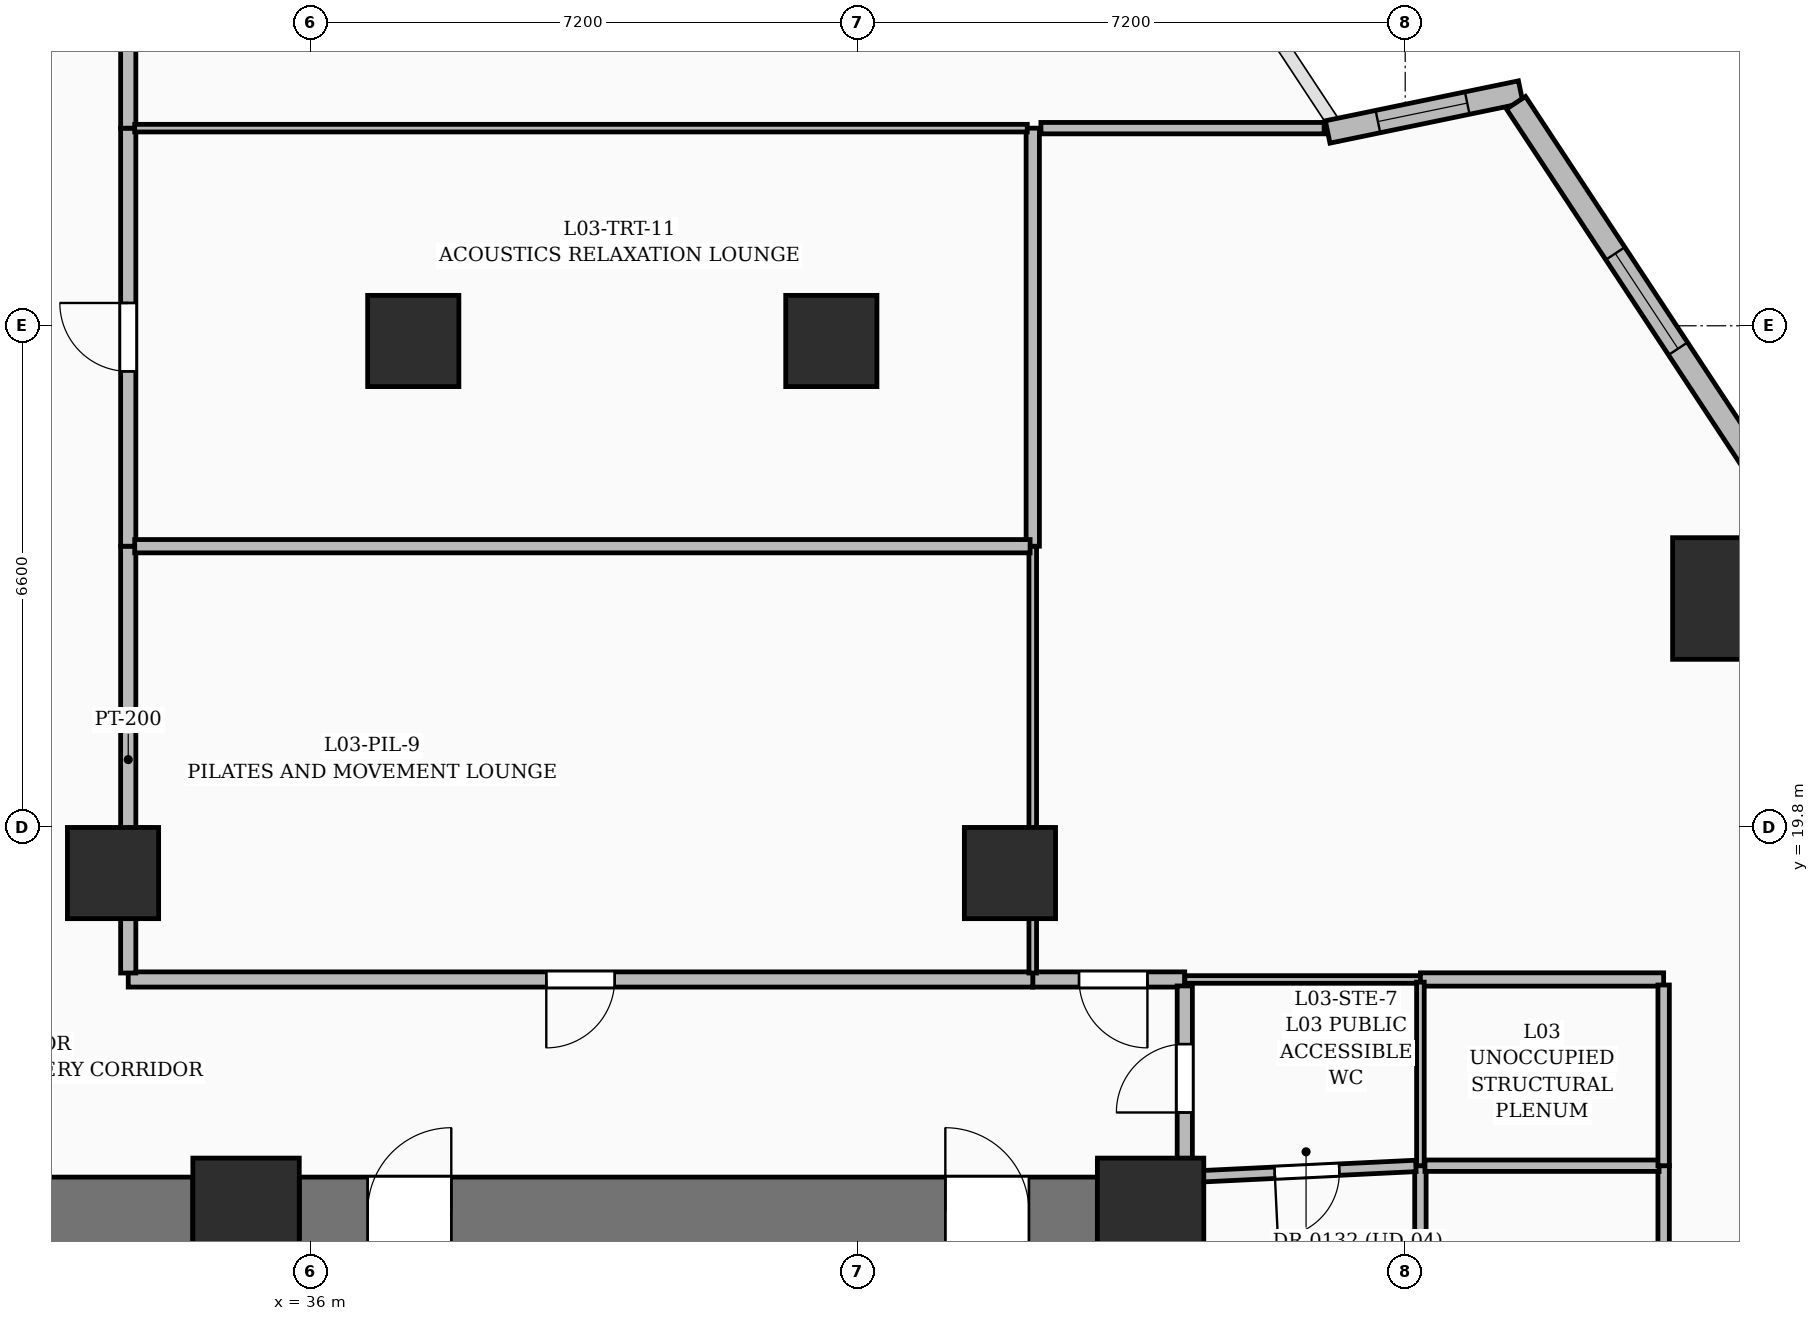
"""IFC4 building model, lengths in metres.
Left out: names, types, materials, properties, quantities, classifications, styles, units other than length and angle.
Written with IfcOpenShell. Run it as: python <this file> out.ifc"""

import sys

from ifc_helpers import new_model, si_unit, direction, frame, frame_2d, origin, origin_2d, place, context, subcontext, project, spatial, rectangle, extrude, element, fill, save


model = new_model("IFC4")
c1 = context("Model", 3, precision=1e-05, world=origin(), true_north=direction((0.0, 1.0)))
c2 = subcontext(c1, "Body", "Model", "MODEL_VIEW")
j1 = project(units=[si_unit("LENGTHUNIT", "METRE"), si_unit("PLANEANGLEUNIT", "RADIAN")], contexts=[c1])
p1 = place(None, origin())
s1 = spatial("IfcSite", under=j1, at=p1, CompositionType="ELEMENT")
p2 = place(p1, origin())
s2 = spatial("IfcBuilding", under=s1, at=p2, CompositionType="ELEMENT")
p3 = place(p2, frame((0.0, 0.0, 17.4)))
s3 = spatial("IfcBuildingStorey", under=s2, at=p3, CompositionType="ELEMENT", Elevation=17.4)
for number, where, z_axis, x_axis in (
    (1, (35.15, 14.75, 0.0), (0.0, 0.0, 1.0), (1.0, 0.0, 0.0)),
    (2, (47.05, 14.75, 0.0), (0.0, 0.0, 1.0), (1.0, 0.0, 0.0)),
):
    element("IfcColumn", number, at=place(p3, frame(where, z_axis=z_axis, x_axis=x_axis)), inside=s3, PredefinedType="COLUMN", context=c2, shape_type="SweptSolid", body=[
        extrude(rectangle(XDim=1.4, YDim=1.4, at=origin_2d()), origin(), (0.0, 0.0, 1.0), 4.5),
    ])
for number, where, z_axis, x_axis in (
    (3, (45.2, 19.2, 0.0), (0.0, 0.0, 1.0), (1.0, 0.0, 0.0)),
    (4, (42.85, 26.2, 0.0), (0.0, 0.0, 1.0), (1.0, 0.0, 0.0)),
    (5, (37.35, 26.2, 0.0), (0.0, 0.0, 1.0), (1.0, 0.0, 0.0)),
    (6, (33.4, 19.2, 0.0), (0.0, 0.0, 1.0), (1.0, 0.0, 0.0)),
):
    element("IfcColumn", number, at=place(p3, frame(where, z_axis=z_axis, x_axis=x_axis)), inside=s3, PredefinedType="COLUMN", context=c2, shape_type="SweptSolid", body=[
        extrude(rectangle(XDim=1.2, YDim=1.2, at=origin_2d()), origin(), (0.0, 0.0, 1.0), 4.5),
    ])
p4 = place(p3, frame((28.25, 14.75, 0.0), z_axis=(0.0, 0.0, 1.0), x_axis=(1.0, 0.0, 0.0)))
e7 = element("IfcWall", 7, at=p4, inside=s3, PredefinedType="SHEAR", context=c2, shape_type="SweptSolid", body=[
    extrude(rectangle(XDim=6.2, YDim=0.9, at=frame_2d((3.1, 0.0))), origin(), (0.0, 0.0, 1.0), 4.5),
])
p5 = place(p4, frame((0.9, 0.0, 0.0)))
e8 = element("IfcOpeningElement", 8, at=p5, cuts=e7, PredefinedType="OPENING", context=c2, shape_type="SweptSolid", body=[
    extrude(rectangle(XDim=1.1, YDim=2.2, at=frame_2d((0.55, 1.1))), frame((0.0, 0.46, 0.0), z_axis=(0.0, -1.0, 0.0), x_axis=(1.0, 0.0, 0.0)), (0.0, 0.0, 1.0), 0.92),
])
p6 = place(p3, frame((35.85, 14.75, 0.0), z_axis=(0.0, 0.0, 1.0), x_axis=(1.0, 0.0, 0.0)))
e9 = element("IfcWall", 9, at=p6, inside=s3, PredefinedType="SHEAR", context=c2, shape_type="SweptSolid", body=[
    extrude(rectangle(XDim=10.5, YDim=0.9, at=frame_2d((5.25, 0.0))), origin(), (0.0, 0.0, 1.0), 4.5),
])
p7 = place(p6, frame((0.9, 0.0, 0.0)))
e10 = element("IfcOpeningElement", 10, at=p7, cuts=e9, PredefinedType="OPENING", context=c2, shape_type="SweptSolid", body=[
    extrude(rectangle(XDim=1.1, YDim=2.2, at=frame_2d((0.55, 1.1))), frame((0.0, 0.46, 0.0), z_axis=(0.0, -1.0, 0.0), x_axis=(1.0, 0.0, 0.0)), (0.0, 0.0, 1.0), 0.92),
])
p8 = place(p6, frame((8.5, 0.0, 0.0)))
e11 = element("IfcOpeningElement", 11, at=p8, cuts=e9, PredefinedType="OPENING", context=c2, shape_type="SweptSolid", body=[
    extrude(rectangle(XDim=1.1, YDim=2.2, at=frame_2d((0.55, 1.1))), frame((0.0, 0.46, 0.0), z_axis=(0.0, -1.0, 0.0), x_axis=(1.0, 0.0, 0.0)), (0.0, 0.0, 1.0), 0.92),
])
p9 = place(p3, frame((54.718, 22.812, 0.0), z_axis=(0.0, 0.0, 1.0), x_axis=(1.0, 0.0, 0.0)))
e12 = element("IfcColumn", 12, at=p9, inside=s3, PredefinedType="COLUMN", context=c2, shape_type="SweptSolid", body=[
    extrude(rectangle(XDim=1.6, YDim=1.6, at=origin_2d()), origin(), (0.0, 0.0, 1.0), 4.5),
])
p10 = place(p3, frame((49.38, 28.95, 0.0), z_axis=(0.0, 0.0, 1.0), x_axis=(0.979255912096, 0.202627388635, 0.0)))
e13 = element("IfcWall", 13, at=p10, inside=s3, PredefinedType="SOLIDWALL", context=c2, shape_type="SweptSolid", body=[
    extrude(rectangle(XDim=2.594, YDim=0.3, at=frame_2d((1.297, 0.0))), origin(), (0.0, 0.0, 1.0), 2.975),
])
p11 = place(p10, frame((0.675, 0.0, 0.8)))
e14 = element("IfcOpeningElement", 14, at=p11, cuts=e13, PredefinedType="OPENING", context=c2, shape_type="SweptSolid", body=[
    extrude(rectangle(XDim=1.2, YDim=1.8, at=frame_2d((0.6, 0.9))), frame((0.0, 0.16, 0.0), z_axis=(0.0, -1.0, 0.0), x_axis=(1.0, 0.0, 0.0)), (0.0, 0.0, 1.0), 0.32),
])
p12 = place(p3, frame((51.857, 29.334, 0.0), z_axis=(0.0, 0.0, 1.0), x_axis=(0.550199688891, -0.835033114519, 0.0)))
e15 = element("IfcWall", 15, at=p12, inside=s3, PredefinedType="SOLIDWALL", context=c2, shape_type="SweptSolid", body=[
    extrude(rectangle(XDim=6.772, YDim=0.3, at=frame_2d((3.386, 0.0))), origin(), (0.0, 0.0, 1.0), 4.2),
])
p13 = place(p12, frame((2.375, 0.0, 0.6)))
e16 = element("IfcOpeningElement", 16, at=p13, cuts=e15, PredefinedType="OPENING", context=c2, shape_type="SweptSolid", body=[
    extrude(rectangle(XDim=1.5, YDim=2.1, at=frame_2d((0.75, 1.05))), frame((0.0, 0.16, 0.0), z_axis=(0.0, -1.0, 0.0), x_axis=(1.0, 0.0, 0.0)), (0.0, 0.0, 1.0), 0.32),
])
p14 = place(p3, frame((47.5, 17.8, 0.0), z_axis=(0.0, 0.0, 1.0), x_axis=(-1.0, 0.0, 0.0)))
e17 = element("IfcWall", 17, at=p14, inside=s3, PredefinedType="PARTITIONING", context=c2, shape_type="SweptSolid", body=[
    extrude(rectangle(XDim=2.0, YDim=0.2, at=frame_2d((1.0, 0.0))), origin(), (0.0, 0.0, 1.0), 3.159),
])
p15 = place(p14, frame((0.491, 0.0, 0.0)))
e18 = element("IfcOpeningElement", 18, at=p15, cuts=e17, PredefinedType="OPENING", context=c2, shape_type="SweptSolid", body=[
    extrude(rectangle(XDim=0.9, YDim=2.1, at=frame_2d((0.45, 1.05))), frame((0.0, 0.11, 0.0), z_axis=(0.0, -1.0, 0.0), x_axis=(1.0, 0.0, 0.0)), (0.0, 0.0, 1.0), 0.22),
])
p16 = place(p3, frame((47.5, 15.2, 0.0), z_axis=(0.0, 0.0, 1.0), x_axis=(0.0, 1.0, 0.0)))
e19 = element("IfcWall", 19, at=p16, inside=s3, PredefinedType="PARTITIONING", context=c2, shape_type="SweptSolid", body=[
    extrude(rectangle(XDim=2.515, YDim=0.2, at=frame_2d((1.258, 0.0))), origin(), (0.0, 0.0, 1.0), 3.078),
])
p17 = place(p16, frame((0.85, 0.0, 0.0)))
e20 = element("IfcOpeningElement", 20, at=p17, cuts=e19, PredefinedType="OPENING", context=c2, shape_type="SweptSolid", body=[
    extrude(rectangle(XDim=0.9, YDim=2.1, at=frame_2d((0.45, 1.05))), frame((0.0, 0.11, 0.0), z_axis=(0.0, -1.0, 0.0), x_axis=(1.0, 0.0, 0.0)), (0.0, 0.0, 1.0), 0.22),
])
p18 = place(p3, frame((45.5, 17.8, 0.0), z_axis=(0.0, 0.0, 1.0), x_axis=(-1.0, 0.0, 0.0)))
e21 = element("IfcWall", 21, at=p18, inside=s3, PredefinedType="PARTITIONING", context=c2, shape_type="SweptSolid", body=[
    extrude(rectangle(XDim=11.9, YDim=0.2, at=frame_2d((5.95, 0.0))), origin(), (0.0, 0.0, 1.0), 3.159),
])
p19 = place(p18, frame((5.5, 0.0, 0.0)))
e22 = element("IfcOpeningElement", 22, at=p19, cuts=e21, PredefinedType="OPENING", context=c2, shape_type="SweptSolid", body=[
    extrude(rectangle(XDim=0.9, YDim=2.1, at=frame_2d((0.45, 1.05))), frame((0.0, 0.11, 0.0), z_axis=(0.0, -1.0, 0.0), x_axis=(1.0, 0.0, 0.0)), (0.0, 0.0, 1.0), 0.22),
])
p20 = place(p3, frame((33.6, 17.885, 0.0), z_axis=(0.0, 0.0, 1.0), x_axis=(0.0, 1.0, 0.0)))
e23 = element("IfcWall", 23, at=p20, inside=s3, PredefinedType="PARTITIONING", context=c2, shape_type="SweptSolid", body=[
    extrude(rectangle(XDim=5.615, YDim=0.2, at=frame_2d((2.808, 0.0))), origin(), (0.0, 0.0, 1.0), 3.159),
])
p21 = place(p3, frame((33.6, 23.5, 0.0), z_axis=(0.0, 0.0, 1.0), x_axis=(0.0, 1.0, 0.0)))
e24 = element("IfcWall", 24, at=p21, inside=s3, PredefinedType="PARTITIONING", context=c2, shape_type="SweptSolid", body=[
    extrude(rectangle(XDim=5.5, YDim=0.2, at=frame_2d((2.75, 0.0))), origin(), (0.0, 0.0, 1.0), 3.71),
])
p22 = place(p21, frame((2.3, 0.0, 0.0)))
e25 = element("IfcOpeningElement", 25, at=p22, cuts=e24, PredefinedType="OPENING", context=c2, shape_type="SweptSolid", body=[
    extrude(rectangle(XDim=0.9, YDim=2.1, at=frame_2d((0.45, 1.05))), frame((0.0, 0.11, 0.0), z_axis=(0.0, -1.0, 0.0), x_axis=(1.0, 0.0, 0.0)), (0.0, 0.0, 1.0), 0.22),
])
p23 = place(p3, frame((33.6, 29.0, 0.0), z_axis=(0.0, 0.0, 1.0), x_axis=(0.0, 1.0, 0.0)))
e26 = element("IfcWall", 26, at=p23, inside=s3, PredefinedType="PARTITIONING", context=c2, shape_type="SweptSolid", body=[
    extrude(rectangle(XDim=4.0, YDim=0.2, at=frame_2d((2.0, 0.0))), origin(), (0.0, 0.0, 1.0), 3.078),
])
p24 = place(p3, frame((50.6, 9.26, 0.0), z_axis=(0.0, 0.0, 1.0), x_axis=(0.0, 1.0, 0.0)))
e27 = element("IfcWall", 27, at=p24, inside=s3, PredefinedType="PARTITIONING", context=c2, shape_type="SweptSolid", body=[
    extrude(rectangle(XDim=6.09, YDim=0.15, at=frame_2d((3.045, 0.0))), origin(), (0.0, 0.0, 1.0), 3.078),
])
p25 = place(p3, frame((50.54, 15.347, 0.0), z_axis=(0.0, 0.0, 1.0), x_axis=(-0.998830110694, -0.048357108796, 0.0)))
e28 = element("IfcWall", 28, at=p25, inside=s3, PredefinedType="PARTITIONING", context=c2, shape_type="SweptSolid", body=[
    extrude(rectangle(XDim=2.958, YDim=0.15, at=frame_2d((1.479, 0.0))), origin(), (0.0, 0.0, 1.0), 3.078),
])
p26 = place(p25, frame((1.009, 0.0, 0.0)))
e29 = element("IfcOpeningElement", 29, at=p26, cuts=e28, PredefinedType="OPENING", context=c2, shape_type="SweptSolid", body=[
    extrude(rectangle(XDim=0.85, YDim=2.1, at=frame_2d((0.425, 1.05))), frame((0.0, 0.085, 0.0), z_axis=(0.0, -1.0, 0.0), x_axis=(1.0, 0.0, 0.0)), (0.0, 0.0, 1.0), 0.17),
])
p27 = place(p3, frame((53.8, 9.26, 0.0), z_axis=(0.0, 0.0, 1.0), x_axis=(0.0, 1.0, 0.0)))
e30 = element("IfcWall", 30, at=p27, inside=s3, PredefinedType="PARTITIONING", context=c2, shape_type="SweptSolid", body=[
    extrude(rectangle(XDim=6.09, YDim=0.15, at=frame_2d((3.045, 0.0))), origin(), (0.0, 0.0, 1.0), 3.078),
])
p28 = place(p3, frame((53.74, 15.35, 0.0), z_axis=(0.0, 0.0, 1.0), x_axis=(-1.0, 0.0, 0.0)))
e31 = element("IfcWall", 31, at=p28, inside=s3, PredefinedType="PARTITIONING", context=c2, shape_type="SweptSolid", body=[
    extrude(rectangle(XDim=3.08, YDim=0.15, at=frame_2d((1.54, 0.0))), origin(), (0.0, 0.0, 1.0), 3.71),
])
p29 = place(p3, frame((47.5, 17.8, 0.0), z_axis=(0.0, 0.0, 1.0), x_axis=(1.0, 0.0, 0.0)))
e32 = element("IfcWall", 32, at=p29, inside=s3, PredefinedType="PARTITIONING", context=c2, shape_type="SweptSolid", body=[
    extrude(rectangle(XDim=3.1, YDim=0.1, at=frame_2d((1.55, 0.0))), origin(), (0.0, 0.0, 1.0), 3.078),
])
p30 = place(p3, frame((50.6, 17.8, 0.0), z_axis=(0.0, 0.0, 1.0), x_axis=(1.0, 0.0, 0.0)))
e33 = element("IfcWall", 33, at=p30, inside=s3, PredefinedType="PARTITIONING", context=c2, shape_type="SweptSolid", body=[
    extrude(rectangle(XDim=3.2, YDim=0.175, at=frame_2d((1.6, 0.0))), origin(), (0.0, 0.0, 1.0), 3.71),
])
p31 = place(p3, frame((53.8, 17.728, 0.0), z_axis=(0.0, 0.0, 1.0), x_axis=(0.0, -1.0, 0.0)))
e34 = element("IfcWall", 34, at=p31, inside=s3, PredefinedType="PARTITIONING", context=c2, shape_type="SweptSolid", body=[
    extrude(rectangle(XDim=2.377, YDim=0.15, at=frame_2d((1.189, 0.0))), origin(), (0.0, 0.0, 1.0), 3.71),
])
p32 = place(p3, frame((45.5, 23.5, 0.0), z_axis=(0.0, 0.0, 1.0), x_axis=(0.0, -1.0, 0.0)))
e35 = element("IfcWall", 35, at=p32, inside=s3, PredefinedType="PARTITIONING", context=c2, shape_type="SweptSolid", body=[
    extrude(rectangle(XDim=5.615, YDim=0.1, at=frame_2d((2.808, 0.0))), origin(), (0.0, 0.0, 1.0), 3.078),
])
p33 = place(p3, frame((45.5, 29.0, 0.0), z_axis=(0.0, 0.0, 1.0), x_axis=(0.0, -1.0, 0.0)))
e36 = element("IfcWall", 36, at=p33, inside=s3, PredefinedType="PARTITIONING", context=c2, shape_type="SweptSolid", body=[
    extrude(rectangle(XDim=5.5, YDim=0.175, at=frame_2d((2.75, 0.0))), origin(), (0.0, 0.0, 1.0), 3.71),
])
p34 = place(p3, frame((50.6, 15.35, 0.0), z_axis=(0.0, 0.0, 1.0), x_axis=(0.0, 1.0, 0.0)))
e37 = element("IfcWall", 37, at=p34, inside=s3, PredefinedType="PARTITIONING", context=c2, shape_type="SweptSolid", body=[
    extrude(rectangle(XDim=2.415, YDim=0.1, at=frame_2d((1.208, 0.0))), origin(), (0.0, 0.0, 1.0), 4.2),
])
p35 = place(p3, frame((45.465, 23.5, 0.0), z_axis=(0.0, 0.0, 1.0), x_axis=(-1.0, 0.0, 0.0)))
e38 = element("IfcWall", 38, at=p35, inside=s3, PredefinedType="PARTITIONING", context=c2, shape_type="SweptSolid", body=[
    extrude(rectangle(XDim=11.78, YDim=0.175, at=frame_2d((5.89, 0.0))), origin(), (0.0, 0.0, 1.0), 3.159),
])
p36 = place(p3, frame((45.427, 29.0, 0.0), z_axis=(0.0, 0.0, 1.0), x_axis=(-1.0, 0.0, 0.0)))
e39 = element("IfcWall", 39, at=p36, inside=s3, PredefinedType="PARTITIONING", context=c2, shape_type="SweptSolid", body=[
    extrude(rectangle(XDim=11.742, YDim=0.1, at=frame_2d((5.871, 0.0))), origin(), (0.0, 0.0, 1.0), 3.078),
])
p37 = place(p3, frame((49.333, 29.0, 0.0), z_axis=(0.0, 0.0, 1.0), x_axis=(-1.0, 0.0, 0.0)))
e40 = element("IfcWall", 40, at=p37, inside=s3, PredefinedType="PARTITIONING", context=c2, shape_type="SweptSolid", body=[
    extrude(rectangle(XDim=3.726, YDim=0.15, at=frame_2d((1.863, 0.0))), origin(), (0.0, 0.0, 1.0), 4.2),
])
p38 = place(p11, origin())
e41 = element("IfcWindow", 41, at=p38, inside=s3, PartitioningType="SINGLE_PANEL", PredefinedType="WINDOW", context=c2, shape_type="SweptSolid", body=[
    extrude(rectangle(XDim=1.2, YDim=1.8, at=frame_2d((0.6, 0.9))), frame((0.0, 0.03, 0.0), z_axis=(0.0, -1.0, 0.0), x_axis=(1.0, 0.0, 0.0)), (0.0, 0.0, 1.0), 0.06),
])
fill(e14, e41)
p39 = place(p13, origin())
e42 = element("IfcWindow", 42, at=p39, inside=s3, PartitioningType="SINGLE_PANEL", PredefinedType="WINDOW", context=c2, shape_type="SweptSolid", body=[
    extrude(rectangle(XDim=1.5, YDim=2.1, at=frame_2d((0.75, 1.05))), frame((0.0, 0.03, 0.0), z_axis=(0.0, -1.0, 0.0), x_axis=(1.0, 0.0, 0.0)), (0.0, 0.0, 1.0), 0.06),
])
fill(e16, e42)
p40 = place(p7, origin())
e43 = element("IfcDoor", 43, at=p40, inside=s3, OperationType="SINGLE_SWING_RIGHT", PredefinedType="DOOR", context=c2, shape_type="SweptSolid", body=[
    extrude(rectangle(XDim=1.1, YDim=2.2, at=frame_2d((0.55, 1.1))), frame((0.0, 0.025, 0.0), z_axis=(0.0, -1.0, 0.0), x_axis=(1.0, 0.0, 0.0)), (0.0, 0.0, 1.0), 0.05),
])
fill(e10, e43)
p41 = place(p8, origin())
e44 = element("IfcDoor", 44, at=p41, inside=s3, OperationType="SINGLE_SWING_LEFT", PredefinedType="DOOR", context=c2, shape_type="SweptSolid", body=[
    extrude(rectangle(XDim=1.1, YDim=2.2, at=frame_2d((0.55, 1.1))), frame((0.0, 0.025, 0.0), z_axis=(0.0, -1.0, 0.0), x_axis=(1.0, 0.0, 0.0)), (0.0, 0.0, 1.0), 0.05),
])
fill(e11, e44)
p42 = place(p19, origin())
e45 = element("IfcDoor", 45, at=p42, inside=s3, OperationType="SINGLE_SWING_RIGHT", PredefinedType="DOOR", context=c2, shape_type="SweptSolid", body=[
    extrude(rectangle(XDim=0.9, YDim=2.1, at=frame_2d((0.45, 1.05))), frame((0.0, 0.025, 0.0), z_axis=(0.0, -1.0, 0.0), x_axis=(1.0, 0.0, 0.0)), (0.0, 0.0, 1.0), 0.05),
])
fill(e22, e45)
p43 = place(p17, origin())
e46 = element("IfcDoor", 46, at=p43, inside=s3, OperationType="SINGLE_SWING_LEFT", PredefinedType="DOOR", context=c2, shape_type="SweptSolid", body=[
    extrude(rectangle(XDim=0.9, YDim=2.1, at=frame_2d((0.45, 1.05))), frame((0.0, 0.025, 0.0), z_axis=(0.0, -1.0, 0.0), x_axis=(1.0, 0.0, 0.0)), (0.0, 0.0, 1.0), 0.05),
])
fill(e20, e46)
p44 = place(p22, origin())
e47 = element("IfcDoor", 47, at=p44, inside=s3, OperationType="SINGLE_SWING_RIGHT", PredefinedType="DOOR", context=c2, shape_type="SweptSolid", body=[
    extrude(rectangle(XDim=0.9, YDim=2.1, at=frame_2d((0.45, 1.05))), frame((0.0, 0.025, 0.0), z_axis=(0.0, -1.0, 0.0), x_axis=(1.0, 0.0, 0.0)), (0.0, 0.0, 1.0), 0.05),
])
fill(e25, e47)
p45 = place(p15, origin())
e48 = element("IfcDoor", 48, at=p45, inside=s3, OperationType="SINGLE_SWING_LEFT", PredefinedType="DOOR", context=c2, shape_type="SweptSolid", body=[
    extrude(rectangle(XDim=0.9, YDim=2.1, at=frame_2d((0.45, 1.05))), frame((0.0, 0.025, 0.0), z_axis=(0.0, -1.0, 0.0), x_axis=(1.0, 0.0, 0.0)), (0.0, 0.0, 1.0), 0.05),
])
fill(e18, e48)
p46 = place(p26, origin())
e49 = element("IfcDoor", 49, at=p46, inside=s3, OperationType="SINGLE_SWING_RIGHT", PredefinedType="DOOR", context=c2, shape_type="SweptSolid", body=[
    extrude(rectangle(XDim=0.85, YDim=2.1, at=frame_2d((0.425, 1.05))), frame((0.0, 0.025, 0.0), z_axis=(0.0, -1.0, 0.0), x_axis=(1.0, 0.0, 0.0)), (0.0, 0.0, 1.0), 0.05),
])
fill(e29, e49)
save(model, sys.argv[1])
